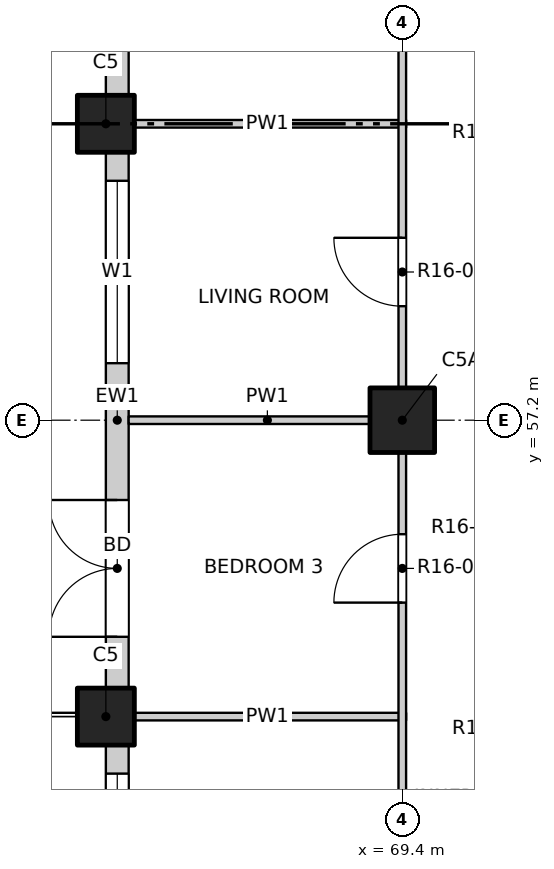
"""IFC4 building model, lengths in metres.
Left out: names, types, materials, properties, quantities, classifications, styles, units other than length and angle.
Written with IfcOpenShell. Run it as: python <this file> out.ifc"""

import sys

from ifc_helpers import new_model, si_unit, direction, frame, frame_2d, origin, origin_2d, place, context, subcontext, project, spatial, rectangle, extrude, element, fill, save


model = new_model("IFC4")
c1 = context("Model", 3, precision=1e-05, world=origin(), true_north=direction((0.0, 1.0)))
c2 = subcontext(c1, "Body", "Model", "MODEL_VIEW")
j1 = project(units=[si_unit("LENGTHUNIT", "METRE"), si_unit("PLANEANGLEUNIT", "RADIAN")], contexts=[c1])
p1 = place(None, origin())
s1 = spatial("IfcSite", under=j1, at=p1, CompositionType="ELEMENT")
p2 = place(p1, origin())
s2 = spatial("IfcBuilding", under=s1, at=p2, CompositionType="ELEMENT")
p3 = place(p2, frame((0.0, 0.0, 169.0)))
s3 = spatial("IfcBuildingStorey", under=s2, at=p3, CompositionType="ELEMENT", Elevation=169.0)
for number, where, z_axis, x_axis in (
    (1, (65.5, 53.3, -0.25), (0.0, 0.0, 1.0), (1.0, 0.0, 0.0)),
    (2, (65.5, 61.1, -0.25), (0.0, 0.0, 1.0), (1.0, 0.0, 0.0)),
):
    element("IfcColumn", number, at=place(p3, frame(where, z_axis=z_axis, x_axis=x_axis)), inside=s3, PredefinedType="COLUMN", context=c2, shape_type="SweptSolid", body=[
        extrude(rectangle(XDim=0.75, YDim=0.75, at=origin_2d()), origin(), (0.0, 0.0, 1.0), 3.35),
    ])
p4 = place(p3, frame((69.4, 57.2, -0.25), z_axis=(0.0, 0.0, 1.0), x_axis=(1.0, 0.0, 0.0)))
e3 = element("IfcColumn", 3, at=p4, inside=s3, PredefinedType="COLUMN", context=c2, shape_type="SweptSolid", body=[
    extrude(rectangle(XDim=0.85, YDim=0.85, at=origin_2d()), origin(), (0.0, 0.0, 1.0), 3.35),
])
p5 = place(p3, frame((65.65, 49.4, 0.0), z_axis=(0.0, 0.0, 1.0), x_axis=(0.0, 1.0, 0.0)))
e4 = element("IfcWall", 4, at=p5, inside=s3, PredefinedType="SOLIDWALL", context=c2, shape_type="SweptSolid", body=[
    extrude(rectangle(XDim=3.525, YDim=0.3, at=frame_2d((1.763, 0.0))), origin(), (0.0, 0.0, 1.0), 3.1),
])
p6 = place(p5, frame((0.75, 0.0, 0.9)))
e5 = element("IfcOpeningElement", 5, at=p6, cuts=e4, PredefinedType="OPENING", context=c2, shape_type="SweptSolid", body=[
    extrude(rectangle(XDim=2.4, YDim=1.8, at=frame_2d((1.2, 0.9))), frame((0.0, 0.16, 0.0), z_axis=(0.0, -1.0, 0.0), x_axis=(1.0, 0.0, 0.0)), (0.0, 0.0, 1.0), 0.32),
])
p7 = place(p3, frame((65.65, 53.675, 0.0), z_axis=(0.0, 0.0, 1.0), x_axis=(0.0, 1.0, 0.0)))
e6 = element("IfcWall", 6, at=p7, inside=s3, PredefinedType="SOLIDWALL", context=c2, shape_type="SweptSolid", body=[
    extrude(rectangle(XDim=7.05, YDim=0.3, at=frame_2d((3.525, 0.0))), origin(), (0.0, 0.0, 1.0), 3.1),
])
p8 = place(p7, frame((0.675, 0.0, 0.0)))
e7 = element("IfcOpeningElement", 7, at=p8, cuts=e6, PredefinedType="OPENING", context=c2, shape_type="SweptSolid", body=[
    extrude(rectangle(XDim=1.8, YDim=2.4, at=frame_2d((0.9, 1.2))), frame((0.0, 0.16, 0.0), z_axis=(0.0, -1.0, 0.0), x_axis=(1.0, 0.0, 0.0)), (0.0, 0.0, 1.0), 0.32),
])
p9 = place(p7, frame((4.275, 0.0, 0.9)))
e8 = element("IfcOpeningElement", 8, at=p9, cuts=e6, PredefinedType="OPENING", context=c2, shape_type="SweptSolid", body=[
    extrude(rectangle(XDim=2.4, YDim=1.8, at=frame_2d((1.2, 0.9))), frame((0.0, 0.16, 0.0), z_axis=(0.0, -1.0, 0.0), x_axis=(1.0, 0.0, 0.0)), (0.0, 0.0, 1.0), 0.32),
])
p10 = place(p3, frame((65.65, 61.475, 0.0), z_axis=(0.0, 0.0, 1.0), x_axis=(0.0, 1.0, 0.0)))
e9 = element("IfcWall", 9, at=p10, inside=s3, PredefinedType="SOLIDWALL", context=c2, shape_type="SweptSolid", body=[
    extrude(rectangle(XDim=7.05, YDim=0.3, at=frame_2d((3.525, 0.0))), origin(), (0.0, 0.0, 1.0), 3.1),
])
p11 = place(p10, frame((0.675, 0.0, 0.0)))
e10 = element("IfcOpeningElement", 10, at=p11, cuts=e9, PredefinedType="OPENING", context=c2, shape_type="SweptSolid", body=[
    extrude(rectangle(XDim=1.8, YDim=2.4, at=frame_2d((0.9, 1.2))), frame((0.0, 0.16, 0.0), z_axis=(0.0, -1.0, 0.0), x_axis=(1.0, 0.0, 0.0)), (0.0, 0.0, 1.0), 0.32),
])
p12 = place(p10, frame((4.275, 0.0, 0.9)))
e11 = element("IfcOpeningElement", 11, at=p12, cuts=e9, PredefinedType="OPENING", context=c2, shape_type="SweptSolid", body=[
    extrude(rectangle(XDim=2.4, YDim=1.8, at=frame_2d((1.2, 0.9))), frame((0.0, 0.16, 0.0), z_axis=(0.0, -1.0, 0.0), x_axis=(1.0, 0.0, 0.0)), (0.0, 0.0, 1.0), 0.32),
])
for number, where, z_axis, x_axis in (
    (12, (65.8, 53.3, 0.0), (0.0, 0.0, 1.0), (1.0, 0.0, 0.0)),
    (13, (65.8, 57.2, 0.0), (0.0, 0.0, 1.0), (1.0, 0.0, 0.0)),
    (14, (65.8, 61.1, 0.0), (0.0, 0.0, 1.0), (1.0, 0.0, 0.0)),
):
    element("IfcWall", number, at=place(p3, frame(where, z_axis=z_axis, x_axis=x_axis)), inside=s3, PredefinedType="PARTITIONING", context=c2, shape_type="SweptSolid", body=[
        extrude(rectangle(XDim=3.65, YDim=0.1, at=frame_2d((1.825, 0.0))), origin(), (0.0, 0.0, 1.0), 3.1),
    ])
p13 = place(p3, frame((69.4, 45.8, 0.0), z_axis=(0.0, 0.0, 1.0), x_axis=(0.0, 1.0, 0.0)))
e15 = element("IfcWall", 15, at=p13, inside=s3, PredefinedType="PARTITIONING", context=c2, shape_type="SweptSolid", body=[
    extrude(rectangle(XDim=38.4, YDim=0.1, at=frame_2d((19.2, 0.0))), origin(), (0.0, 0.0, 1.0), 3.1),
])
p14 = place(p13, frame((1.05, 0.0, 0.0)))
e16 = element("IfcOpeningElement", 16, at=p14, cuts=e15, PredefinedType="OPENING", context=c2, shape_type="SweptSolid", body=[
    extrude(rectangle(XDim=1.2, YDim=2.1, at=frame_2d((0.6, 1.05))), frame((0.0, 0.06, 0.0), z_axis=(0.0, -1.0, 0.0), x_axis=(1.0, 0.0, 0.0)), (0.0, 0.0, 1.0), 0.12),
])
p15 = place(p13, frame((5.1, 0.0, 0.0)))
e17 = element("IfcOpeningElement", 17, at=p15, cuts=e15, PredefinedType="OPENING", context=c2, shape_type="SweptSolid", body=[
    extrude(rectangle(XDim=0.9, YDim=2.1, at=frame_2d((0.45, 1.05))), frame((0.0, 0.06, 0.0), z_axis=(0.0, -1.0, 0.0), x_axis=(1.0, 0.0, 0.0)), (0.0, 0.0, 1.0), 0.12),
])
p16 = place(p13, frame((9.0, 0.0, 0.0)))
e18 = element("IfcOpeningElement", 18, at=p16, cuts=e15, PredefinedType="OPENING", context=c2, shape_type="SweptSolid", body=[
    extrude(rectangle(XDim=0.9, YDim=2.1, at=frame_2d((0.45, 1.05))), frame((0.0, 0.06, 0.0), z_axis=(0.0, -1.0, 0.0), x_axis=(1.0, 0.0, 0.0)), (0.0, 0.0, 1.0), 0.12),
])
p17 = place(p13, frame((12.9, 0.0, 0.0)))
e19 = element("IfcOpeningElement", 19, at=p17, cuts=e15, PredefinedType="OPENING", context=c2, shape_type="SweptSolid", body=[
    extrude(rectangle(XDim=0.9, YDim=2.1, at=frame_2d((0.45, 1.05))), frame((0.0, 0.06, 0.0), z_axis=(0.0, -1.0, 0.0), x_axis=(1.0, 0.0, 0.0)), (0.0, 0.0, 1.0), 0.12),
])
p18 = place(p13, frame((16.8, 0.0, 0.0)))
e20 = element("IfcOpeningElement", 20, at=p18, cuts=e15, PredefinedType="OPENING", context=c2, shape_type="SweptSolid", body=[
    extrude(rectangle(XDim=0.9, YDim=2.1, at=frame_2d((0.45, 1.05))), frame((0.0, 0.06, 0.0), z_axis=(0.0, -1.0, 0.0), x_axis=(1.0, 0.0, 0.0)), (0.0, 0.0, 1.0), 0.12),
])
p19 = place(p13, frame((20.7, 0.0, 0.0)))
e21 = element("IfcOpeningElement", 21, at=p19, cuts=e15, PredefinedType="OPENING", context=c2, shape_type="SweptSolid", body=[
    extrude(rectangle(XDim=0.9, YDim=2.1, at=frame_2d((0.45, 1.05))), frame((0.0, 0.06, 0.0), z_axis=(0.0, -1.0, 0.0), x_axis=(1.0, 0.0, 0.0)), (0.0, 0.0, 1.0), 0.12),
])
p20 = place(p13, frame((24.6, 0.0, 0.0)))
e22 = element("IfcOpeningElement", 22, at=p20, cuts=e15, PredefinedType="OPENING", context=c2, shape_type="SweptSolid", body=[
    extrude(rectangle(XDim=0.9, YDim=2.1, at=frame_2d((0.45, 1.05))), frame((0.0, 0.06, 0.0), z_axis=(0.0, -1.0, 0.0), x_axis=(1.0, 0.0, 0.0)), (0.0, 0.0, 1.0), 0.12),
])
p21 = place(p13, frame((28.5, 0.0, 0.0)))
e23 = element("IfcOpeningElement", 23, at=p21, cuts=e15, PredefinedType="OPENING", context=c2, shape_type="SweptSolid", body=[
    extrude(rectangle(XDim=0.9, YDim=2.1, at=frame_2d((0.45, 1.05))), frame((0.0, 0.06, 0.0), z_axis=(0.0, -1.0, 0.0), x_axis=(1.0, 0.0, 0.0)), (0.0, 0.0, 1.0), 0.12),
])
p22 = place(p13, frame((32.4, 0.0, 0.0)))
e24 = element("IfcOpeningElement", 24, at=p22, cuts=e15, PredefinedType="OPENING", context=c2, shape_type="SweptSolid", body=[
    extrude(rectangle(XDim=0.9, YDim=2.1, at=frame_2d((0.45, 1.05))), frame((0.0, 0.06, 0.0), z_axis=(0.0, -1.0, 0.0), x_axis=(1.0, 0.0, 0.0)), (0.0, 0.0, 1.0), 0.12),
])
p23 = place(p13, frame((36.15, 0.0, 0.0)))
e25 = element("IfcOpeningElement", 25, at=p23, cuts=e15, PredefinedType="OPENING", context=c2, shape_type="SweptSolid", body=[
    extrude(rectangle(XDim=1.2, YDim=2.1, at=frame_2d((0.6, 1.05))), frame((0.0, 0.06, 0.0), z_axis=(0.0, -1.0, 0.0), x_axis=(1.0, 0.0, 0.0)), (0.0, 0.0, 1.0), 0.12),
])
p24 = place(p6, origin())
e26 = element("IfcWindow", 26, at=p24, inside=s3, PartitioningType="DOUBLE_PANEL_VERTICAL", PredefinedType="WINDOW", context=c2, shape_type="SweptSolid", body=[
    extrude(rectangle(XDim=2.4, YDim=1.8, at=frame_2d((1.2, 0.9))), frame((0.0, 0.03, 0.0), z_axis=(0.0, -1.0, 0.0), x_axis=(1.0, 0.0, 0.0)), (0.0, 0.0, 1.0), 0.06),
])
fill(e5, e26)
p25 = place(p8, origin())
e27 = element("IfcDoor", 27, at=p25, inside=s3, OperationType="DOUBLE_DOOR_SINGLE_SWING", PredefinedType="DOOR", context=c2, shape_type="SweptSolid", body=[
    extrude(rectangle(XDim=1.8, YDim=2.4, at=frame_2d((0.9, 1.2))), frame((0.0, 0.025, 0.0), z_axis=(0.0, -1.0, 0.0), x_axis=(1.0, 0.0, 0.0)), (0.0, 0.0, 1.0), 0.05),
])
fill(e7, e27)
p26 = place(p9, origin())
e28 = element("IfcWindow", 28, at=p26, inside=s3, PartitioningType="DOUBLE_PANEL_VERTICAL", PredefinedType="WINDOW", context=c2, shape_type="SweptSolid", body=[
    extrude(rectangle(XDim=2.4, YDim=1.8, at=frame_2d((1.2, 0.9))), frame((0.0, 0.03, 0.0), z_axis=(0.0, -1.0, 0.0), x_axis=(1.0, 0.0, 0.0)), (0.0, 0.0, 1.0), 0.06),
])
fill(e8, e28)
p27 = place(p16, origin())
e29 = element("IfcDoor", 29, at=p27, inside=s3, OperationType="SINGLE_SWING_LEFT", PredefinedType="DOOR", context=c2, shape_type="SweptSolid", body=[
    extrude(rectangle(XDim=0.9, YDim=2.1, at=frame_2d((0.45, 1.05))), frame((0.0, 0.025, 0.0), z_axis=(0.0, -1.0, 0.0), x_axis=(1.0, 0.0, 0.0)), (0.0, 0.0, 1.0), 0.05),
])
fill(e18, e29)
p28 = place(p17, origin())
e30 = element("IfcDoor", 30, at=p28, inside=s3, OperationType="SINGLE_SWING_RIGHT", PredefinedType="DOOR", context=c2, shape_type="SweptSolid", body=[
    extrude(rectangle(XDim=0.9, YDim=2.1, at=frame_2d((0.45, 1.05))), frame((0.0, 0.025, 0.0), z_axis=(0.0, -1.0, 0.0), x_axis=(1.0, 0.0, 0.0)), (0.0, 0.0, 1.0), 0.05),
])
fill(e19, e30)
save(model, sys.argv[1])
